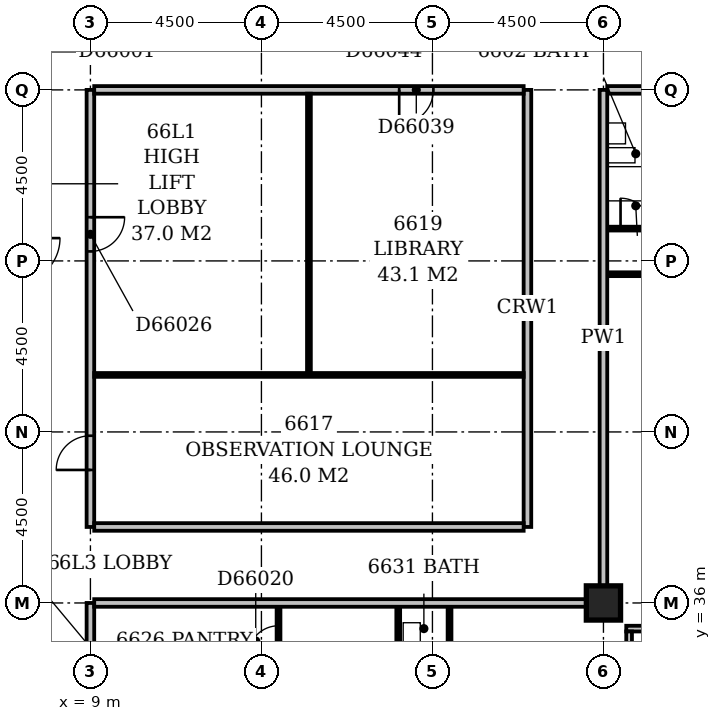
"""IFC4 building model, lengths in metres.
Left out: names, types, materials, properties, quantities, classifications, styles, units other than length and angle.
Written with IfcOpenShell. Run it as: python <this file> out.ifc"""

import sys

from ifc_helpers import new_model, si_unit, direction, frame, frame_2d, origin, origin_2d, place, context, subcontext, project, spatial, rectangle, extrude, element, fill, save


model = new_model("IFC4")
c1 = context("Model", 3, precision=1e-05, world=origin(), true_north=direction((0.0, 1.0)))
c2 = subcontext(c1, "Body", "Model", "MODEL_VIEW")
j1 = project(units=[si_unit("LENGTHUNIT", "METRE"), si_unit("PLANEANGLEUNIT", "RADIAN")], contexts=[c1])
p1 = place(None, origin())
s1 = spatial("IfcSite", under=j1, at=p1, CompositionType="ELEMENT")
p2 = place(p1, origin())
s2 = spatial("IfcBuilding", under=s1, at=p2, CompositionType="ELEMENT")
p3 = place(p2, frame((0.0, 0.0, 254.6)))
s3 = spatial("IfcBuildingStorey", under=s2, at=p3, CompositionType="ELEMENT", Elevation=254.6)
p4 = place(p3, frame((22.5, 36.0, -0.3), z_axis=(0.0, 0.0, 1.0), x_axis=(1.0, 0.0, 0.0)))
e1 = element("IfcColumn", 1, at=p4, inside=s3, PredefinedType="COLUMN", context=c2, shape_type="SweptSolid", body=[
    extrude(rectangle(XDim=0.9, YDim=0.9, at=origin_2d()), origin(), (0.0, 0.0, 1.0), 3.45),
])
p5 = place(p3, frame((23.175, 17.4, 0.0), z_axis=(0.0, 0.0, 1.0), x_axis=(0.0, 1.0, 0.0)))
e2 = element("IfcWall", 2, at=p5, inside=s3, PredefinedType="STANDARD", context=c2, shape_type="SweptSolid", body=[
    extrude(rectangle(XDim=17.85, YDim=0.15, at=frame_2d((8.925, 0.0))), origin(), (0.0, 0.0, 1.0), 2.7),
])
p6 = place(p5, frame((1.65, 0.0, 0.6)))
e3 = element("IfcOpeningElement", 3, at=p6, cuts=e2, PredefinedType="OPENING", context=c2, shape_type="SweptSolid", body=[
    extrude(rectangle(XDim=2.4, YDim=1.8, at=frame_2d((1.2, 0.9))), frame((0.0, 0.087, 0.0), z_axis=(0.0, -1.0, 0.0), x_axis=(1.0, 0.0, 0.0)), (0.0, 0.0, 1.0), 0.174),
])
p7 = place(p5, frame((6.15, 0.0, 0.6)))
e4 = element("IfcOpeningElement", 4, at=p7, cuts=e2, PredefinedType="OPENING", context=c2, shape_type="SweptSolid", body=[
    extrude(rectangle(XDim=2.4, YDim=1.8, at=frame_2d((1.2, 0.9))), frame((0.0, 0.087, 0.0), z_axis=(0.0, -1.0, 0.0), x_axis=(1.0, 0.0, 0.0)), (0.0, 0.0, 1.0), 0.174),
])
p8 = place(p5, frame((10.65, 0.0, 0.6)))
e5 = element("IfcOpeningElement", 5, at=p8, cuts=e2, PredefinedType="OPENING", context=c2, shape_type="SweptSolid", body=[
    extrude(rectangle(XDim=2.4, YDim=1.8, at=frame_2d((1.2, 0.9))), frame((0.0, 0.087, 0.0), z_axis=(0.0, -1.0, 0.0), x_axis=(1.0, 0.0, 0.0)), (0.0, 0.0, 1.0), 0.174),
])
p9 = place(p5, frame((14.817, 0.0, 0.6)))
e6 = element("IfcOpeningElement", 6, at=p9, cuts=e2, PredefinedType="OPENING", context=c2, shape_type="SweptSolid", body=[
    extrude(rectangle(XDim=0.9, YDim=1.8, at=frame_2d((0.45, 0.9))), frame((0.0, 0.087, 0.0), z_axis=(0.0, -1.0, 0.0), x_axis=(1.0, 0.0, 0.0)), (0.0, 0.0, 1.0), 0.174),
])
p10 = place(p3, frame((23.1, 35.325, 0.0), z_axis=(0.0, 0.0, 1.0), x_axis=(1.0, 0.0, 0.0)))
e7 = element("IfcWall", 7, at=p10, inside=s3, PredefinedType="STANDARD", context=c2, shape_type="SweptSolid", body=[
    extrude(rectangle(XDim=18.15, YDim=0.15, at=frame_2d((9.075, 0.0))), origin(), (0.0, 0.0, 1.0), 2.7),
])
p11 = place(p10, frame((0.45, 0.0, 0.6)))
e8 = element("IfcOpeningElement", 8, at=p11, cuts=e7, PredefinedType="OPENING", context=c2, shape_type="SweptSolid", body=[
    extrude(rectangle(XDim=2.4, YDim=1.8, at=frame_2d((1.2, 0.9))), frame((0.0, 0.087, 0.0), z_axis=(0.0, -1.0, 0.0), x_axis=(1.0, 0.0, 0.0)), (0.0, 0.0, 1.0), 0.174),
])
p12 = place(p10, frame((4.95, 0.0, 0.6)))
e9 = element("IfcOpeningElement", 9, at=p12, cuts=e7, PredefinedType="OPENING", context=c2, shape_type="SweptSolid", body=[
    extrude(rectangle(XDim=2.4, YDim=1.8, at=frame_2d((1.2, 0.9))), frame((0.0, 0.087, 0.0), z_axis=(0.0, -1.0, 0.0), x_axis=(1.0, 0.0, 0.0)), (0.0, 0.0, 1.0), 0.174),
])
p13 = place(p10, frame((9.45, 0.0, 0.6)))
e10 = element("IfcOpeningElement", 10, at=p13, cuts=e7, PredefinedType="OPENING", context=c2, shape_type="SweptSolid", body=[
    extrude(rectangle(XDim=2.4, YDim=1.8, at=frame_2d((1.2, 0.9))), frame((0.0, 0.087, 0.0), z_axis=(0.0, -1.0, 0.0), x_axis=(1.0, 0.0, 0.0)), (0.0, 0.0, 1.0), 0.174),
])
p14 = place(p10, frame((13.646, 0.0, 0.6)))
e11 = element("IfcOpeningElement", 11, at=p14, cuts=e7, PredefinedType="OPENING", context=c2, shape_type="SweptSolid", body=[
    extrude(rectangle(XDim=1.8, YDim=1.8, at=frame_2d((0.9, 0.9))), frame((0.0, 0.087, 0.0), z_axis=(0.0, -1.0, 0.0), x_axis=(1.0, 0.0, 0.0)), (0.0, 0.0, 1.0), 0.174),
])
p15 = place(p3, frame((17.1, 17.4, 0.0), z_axis=(0.0, 0.0, 1.0), x_axis=(0.0, 1.0, 0.0)))
e12 = element("IfcWall", 12, at=p15, inside=s3, PredefinedType="PARTITIONING", context=c2, shape_type="SweptSolid", body=[
    extrude(rectangle(XDim=18.5, YDim=0.1, at=frame_2d((9.25, 0.0))), origin(), (0.0, 0.0, 1.0), 3.15),
])
p16 = place(p15, frame((3.55, 0.0, 0.0)))
e13 = element("IfcOpeningElement", 13, at=p16, cuts=e12, PredefinedType="OPENING", context=c2, shape_type="SweptSolid", body=[
    extrude(rectangle(XDim=0.9, YDim=2.1, at=frame_2d((0.45, 1.05))), frame((0.0, 0.062, 0.0), z_axis=(0.0, -1.0, 0.0), x_axis=(1.0, 0.0, 0.0)), (0.0, 0.0, 1.0), 0.124),
])
p17 = place(p15, frame((9.1, 0.0, 0.0)))
e14 = element("IfcOpeningElement", 14, at=p17, cuts=e12, PredefinedType="OPENING", context=c2, shape_type="SweptSolid", body=[
    extrude(rectangle(XDim=0.9, YDim=2.1, at=frame_2d((0.45, 1.05))), frame((0.0, 0.062, 0.0), z_axis=(0.0, -1.0, 0.0), x_axis=(1.0, 0.0, 0.0)), (0.0, 0.0, 1.0), 0.124),
])
p18 = place(p15, frame((14.75, 0.0, 0.0)))
e15 = element("IfcOpeningElement", 15, at=p18, cuts=e12, PredefinedType="OPENING", context=c2, shape_type="SweptSolid", body=[
    extrude(rectangle(XDim=0.9, YDim=2.1, at=frame_2d((0.45, 1.05))), frame((0.0, 0.062, 0.0), z_axis=(0.0, -1.0, 0.0), x_axis=(1.0, 0.0, 0.0)), (0.0, 0.0, 1.0), 0.124),
])
p19 = place(p3, frame((9.0, 18.45, 0.0), z_axis=(0.0, 0.0, 1.0), x_axis=(0.0, 1.0, 0.0)))
e16 = element("IfcWall", 16, at=p19, inside=s3, PredefinedType="PARTITIONING", context=c2, shape_type="SweptSolid", body=[
    extrude(rectangle(XDim=17.55, YDim=0.2, at=frame_2d((8.775, 0.0))), origin(), (0.0, 0.0, 1.0), 3.15),
])
p20 = place(p19, frame((6.75, 0.0, 0.0)))
e17 = element("IfcOpeningElement", 17, at=p20, cuts=e16, PredefinedType="OPENING", context=c2, shape_type="SweptSolid", body=[
    extrude(rectangle(XDim=1.0, YDim=2.1, at=frame_2d((0.5, 1.05))), frame((0.0, 0.112, 0.0), z_axis=(0.0, -1.0, 0.0), x_axis=(1.0, 0.0, 0.0)), (0.0, 0.0, 1.0), 0.224),
])
p21 = place(p3, frame((13.95, 26.5, 0.0), z_axis=(0.0, 0.0, 1.0), x_axis=(0.0, 1.0, 0.0)))
e18 = element("IfcWall", 18, at=p21, inside=s3, PredefinedType="PARTITIONING", context=c2, shape_type="SweptSolid", body=[
    extrude(rectangle(XDim=9.4, YDim=0.1, at=frame_2d((4.7, 0.0))), origin(), (0.0, 0.0, 1.0), 3.15),
])
p22 = place(p21, frame((0.8, 0.0, 0.0)))
e19 = element("IfcOpeningElement", 19, at=p22, cuts=e18, PredefinedType="OPENING", context=c2, shape_type="SweptSolid", body=[
    extrude(rectangle(XDim=0.8, YDim=2.1, at=frame_2d((0.4, 1.05))), frame((0.0, 0.062, 0.0), z_axis=(0.0, -1.0, 0.0), x_axis=(1.0, 0.0, 0.0)), (0.0, 0.0, 1.0), 0.124),
])
p23 = place(p21, frame((8.1, 0.0, 0.0)))
e20 = element("IfcOpeningElement", 20, at=p23, cuts=e18, PredefinedType="OPENING", context=c2, shape_type="SweptSolid", body=[
    extrude(rectangle(XDim=0.8, YDim=2.1, at=frame_2d((0.4, 1.05))), frame((0.0, 0.062, 0.0), z_axis=(0.0, -1.0, 0.0), x_axis=(1.0, 0.0, 0.0)), (0.0, 0.0, 1.0), 0.124),
])
p24 = place(p21, frame((4.3, 0.0, 0.0)))
e21 = element("IfcOpeningElement", 21, at=p24, cuts=e18, PredefinedType="OPENING", context=c2, shape_type="SweptSolid", body=[
    extrude(rectangle(XDim=0.8, YDim=2.1, at=frame_2d((0.4, 1.05))), frame((0.0, 0.062, 0.0), z_axis=(0.0, -1.0, 0.0), x_axis=(1.0, 0.0, 0.0)), (0.0, 0.0, 1.0), 0.124),
])
p25 = place(p21, frame((6.1, 0.0, 0.0)))
e22 = element("IfcOpeningElement", 22, at=p25, cuts=e18, PredefinedType="OPENING", context=c2, shape_type="SweptSolid", body=[
    extrude(rectangle(XDim=0.8, YDim=2.1, at=frame_2d((0.4, 1.05))), frame((0.0, 0.062, 0.0), z_axis=(0.0, -1.0, 0.0), x_axis=(1.0, 0.0, 0.0)), (0.0, 0.0, 1.0), 0.124),
])
p26 = place(p21, frame((2.75, 0.0, 0.0)))
e23 = element("IfcOpeningElement", 23, at=p26, cuts=e18, PredefinedType="OPENING", context=c2, shape_type="SweptSolid", body=[
    extrude(rectangle(XDim=0.8, YDim=2.1, at=frame_2d((0.4, 1.05))), frame((0.0, 0.062, 0.0), z_axis=(0.0, -1.0, 0.0), x_axis=(1.0, 0.0, 0.0)), (0.0, 0.0, 1.0), 0.124),
])
p27 = place(p3, frame((18.45, 33.7, 0.0), z_axis=(0.0, 0.0, 1.0), x_axis=(0.0, 1.0, 0.0)))
e24 = element("IfcWall", 24, at=p27, inside=s3, PredefinedType="PLUMBINGWALL", context=c2, shape_type="SweptSolid", body=[
    extrude(rectangle(XDim=2.2, YDim=0.1, at=frame_2d((1.1, 0.0))), origin(), (0.0, 0.0, 1.0), 3.15),
])
p28 = place(p3, frame((9.1, 36.0, 0.0), z_axis=(0.0, 0.0, 1.0), x_axis=(1.0, 0.0, 0.0)))
e25 = element("IfcWall", 25, at=p28, inside=s3, PredefinedType="PARTITIONING", context=c2, shape_type="SweptSolid", body=[
    extrude(rectangle(XDim=12.95, YDim=0.2, at=frame_2d((6.475, 0.0))), origin(), (0.0, 0.0, 1.0), 3.15),
])
p29 = place(p3, frame((22.5, 36.45, 0.0), z_axis=(0.0, 0.0, 1.0), x_axis=(0.0, 1.0, 0.0)))
e26 = element("IfcWall", 26, at=p29, inside=s3, PredefinedType="PARTITIONING", context=c2, shape_type="SweptSolid", body=[
    extrude(rectangle(XDim=13.05, YDim=0.2, at=frame_2d((6.525, 0.0))), origin(), (0.0, 0.0, 1.0), 3.15),
])
p30 = place(p3, frame((9.0, 38.0, 0.0), z_axis=(0.0, 0.0, 1.0), x_axis=(0.0, 1.0, 0.0)))
e27 = element("IfcWall", 27, at=p30, inside=s3, PredefinedType="PARTITIONING", context=c2, shape_type="SweptSolid", body=[
    extrude(rectangle(XDim=11.5, YDim=0.2, at=frame_2d((5.75, 0.0))), origin(), (0.0, 0.0, 1.0), 3.15),
])
p31 = place(p30, frame((1.5, 0.0, 0.0)))
e28 = element("IfcOpeningElement", 28, at=p31, cuts=e27, PredefinedType="OPENING", context=c2, shape_type="SweptSolid", body=[
    extrude(rectangle(XDim=0.9, YDim=2.1, at=frame_2d((0.45, 1.05))), frame((0.0, 0.112, 0.0), z_axis=(0.0, -1.0, 0.0), x_axis=(1.0, 0.0, 0.0)), (0.0, 0.0, 1.0), 0.224),
])
p32 = place(p30, frame((7.25, 0.0, 0.0)))
e29 = element("IfcOpeningElement", 29, at=p32, cuts=e27, PredefinedType="OPENING", context=c2, shape_type="SweptSolid", body=[
    extrude(rectangle(XDim=0.9, YDim=2.1, at=frame_2d((0.45, 1.05))), frame((0.0, 0.112, 0.0), z_axis=(0.0, -1.0, 0.0), x_axis=(1.0, 0.0, 0.0)), (0.0, 0.0, 1.0), 0.224),
])
p33 = place(p3, frame((9.1, 38.0, 0.0), z_axis=(0.0, 0.0, 1.0), x_axis=(1.0, 0.0, 0.0)))
e30 = element("IfcWall", 30, at=p33, inside=s3, PredefinedType="PARTITIONING", context=c2, shape_type="SweptSolid", body=[
    extrude(rectangle(XDim=11.3, YDim=0.2, at=frame_2d((5.65, 0.0))), origin(), (0.0, 0.0, 1.0), 3.15),
])
p34 = place(p3, frame((20.5, 38.0, 0.0), z_axis=(0.0, 0.0, 1.0), x_axis=(0.0, 1.0, 0.0)))
e31 = element("IfcWall", 31, at=p34, inside=s3, PredefinedType="PARTITIONING", context=c2, shape_type="SweptSolid", body=[
    extrude(rectangle(XDim=11.5, YDim=0.2, at=frame_2d((5.75, 0.0))), origin(), (0.0, 0.0, 1.0), 3.15),
])
p35 = place(p3, frame((9.1, 42.0, 0.0), z_axis=(0.0, 0.0, 1.0), x_axis=(1.0, 0.0, 0.0)))
e32 = element("IfcWall", 32, at=p35, inside=s3, PredefinedType="PARTITIONING", context=c2, shape_type="SweptSolid", body=[
    extrude(rectangle(XDim=11.3, YDim=0.1, at=frame_2d((5.65, 0.0))), origin(), (0.0, 0.0, 1.0), 3.15),
])
p36 = place(p3, frame((14.75, 42.05, 0.0), z_axis=(0.0, 0.0, 1.0), x_axis=(0.0, 1.0, 0.0)))
e33 = element("IfcWall", 33, at=p36, inside=s3, PredefinedType="PARTITIONING", context=c2, shape_type="SweptSolid", body=[
    extrude(rectangle(XDim=7.35, YDim=0.1, at=frame_2d((3.675, 0.0))), origin(), (0.0, 0.0, 1.0), 3.15),
])
p37 = place(p3, frame((22.6, 44.65, 0.0), z_axis=(0.0, 0.0, 1.0), x_axis=(1.0, 0.0, 0.0)))
e34 = element("IfcWall", 34, at=p37, inside=s3, PredefinedType="PARTITIONING", context=c2, shape_type="SweptSolid", body=[
    extrude(rectangle(XDim=4.3, YDim=0.1, at=frame_2d((2.15, 0.0))), origin(), (0.0, 0.0, 1.0), 3.15),
])
p38 = place(p37, frame((1.7, 0.0, 0.0)))
e35 = element("IfcOpeningElement", 35, at=p38, cuts=e34, PredefinedType="OPENING", context=c2, shape_type="SweptSolid", body=[
    extrude(rectangle(XDim=0.9, YDim=2.1, at=frame_2d((0.45, 1.05))), frame((0.0, 0.062, 0.0), z_axis=(0.0, -1.0, 0.0), x_axis=(1.0, 0.0, 0.0)), (0.0, 0.0, 1.0), 0.124),
])
p39 = place(p3, frame((22.6, 45.85, 0.0), z_axis=(0.0, 0.0, 1.0), x_axis=(1.0, 0.0, 0.0)))
e36 = element("IfcWall", 36, at=p39, inside=s3, PredefinedType="PARTITIONING", context=c2, shape_type="SweptSolid", body=[
    extrude(rectangle(XDim=1.55, YDim=0.1, at=frame_2d((0.775, 0.0))), origin(), (0.0, 0.0, 1.0), 3.15),
])
p40 = place(p39, frame((0.35, 0.0, 0.0)))
e37 = element("IfcOpeningElement", 37, at=p40, cuts=e36, PredefinedType="OPENING", context=c2, shape_type="SweptSolid", body=[
    extrude(rectangle(XDim=0.8, YDim=2.1, at=frame_2d((0.4, 1.05))), frame((0.0, 0.062, 0.0), z_axis=(0.0, -1.0, 0.0), x_axis=(1.0, 0.0, 0.0)), (0.0, 0.0, 1.0), 0.124),
])
p41 = place(p3, frame((9.1, 49.5, 0.0), z_axis=(0.0, 0.0, 1.0), x_axis=(1.0, 0.0, 0.0)))
e38 = element("IfcWall", 38, at=p41, inside=s3, PredefinedType="PARTITIONING", context=c2, shape_type="SweptSolid", body=[
    extrude(rectangle(XDim=11.3, YDim=0.2, at=frame_2d((5.65, 0.0))), origin(), (0.0, 0.0, 1.0), 3.15),
])
p42 = place(p41, frame((8.025, 0.0, 0.0)))
e39 = element("IfcOpeningElement", 39, at=p42, cuts=e38, PredefinedType="OPENING", context=c2, shape_type="SweptSolid", body=[
    extrude(rectangle(XDim=0.9, YDim=2.1, at=frame_2d((0.45, 1.05))), frame((0.0, 0.112, 0.0), z_axis=(0.0, -1.0, 0.0), x_axis=(1.0, 0.0, 0.0)), (0.0, 0.0, 1.0), 0.224),
])
p43 = place(p3, frame((22.6, 49.5, 0.0), z_axis=(0.0, 0.0, 1.0), x_axis=(1.0, 0.0, 0.0)))
e40 = element("IfcWall", 40, at=p43, inside=s3, PredefinedType="PARTITIONING", context=c2, shape_type="SweptSolid", body=[
    extrude(rectangle(XDim=21.95, YDim=0.2, at=frame_2d((10.975, 0.0))), origin(), (0.0, 0.0, 1.0), 3.15),
])
p44 = place(p43, frame((1.85, 0.0, 0.0)))
e41 = element("IfcOpeningElement", 41, at=p44, cuts=e40, PredefinedType="OPENING", context=c2, shape_type="SweptSolid", body=[
    extrude(rectangle(XDim=1.0, YDim=2.1, at=frame_2d((0.5, 1.05))), frame((0.0, 0.112, 0.0), z_axis=(0.0, -1.0, 0.0), x_axis=(1.0, 0.0, 0.0)), (0.0, 0.0, 1.0), 0.224),
])
p45 = place(p43, frame((9.7, 0.0, 0.0)))
e42 = element("IfcOpeningElement", 42, at=p45, cuts=e40, PredefinedType="OPENING", context=c2, shape_type="SweptSolid", body=[
    extrude(rectangle(XDim=1.0, YDim=2.1, at=frame_2d((0.5, 1.05))), frame((0.0, 0.112, 0.0), z_axis=(0.0, -1.0, 0.0), x_axis=(1.0, 0.0, 0.0)), (0.0, 0.0, 1.0), 0.224),
])
p46 = place(p43, frame((15.05, 0.0, 0.0)))
e43 = element("IfcOpeningElement", 43, at=p46, cuts=e40, PredefinedType="OPENING", context=c2, shape_type="SweptSolid", body=[
    extrude(rectangle(XDim=1.0, YDim=2.1, at=frame_2d((0.5, 1.05))), frame((0.0, 0.112, 0.0), z_axis=(0.0, -1.0, 0.0), x_axis=(1.0, 0.0, 0.0)), (0.0, 0.0, 1.0), 0.224),
])
p47 = place(p23, origin())
e44 = element("IfcDoor", 44, at=p47, inside=s3, OperationType="SINGLE_SWING_LEFT", PredefinedType="DOOR", context=c2, shape_type="SweptSolid", body=[
    extrude(rectangle(XDim=0.8, YDim=2.1, at=frame_2d((0.4, 1.05))), frame((0.0, 0.025, 0.0), z_axis=(0.0, -1.0, 0.0), x_axis=(1.0, 0.0, 0.0)), (0.0, 0.0, 1.0), 0.05),
])
fill(e20, e44)
p48 = place(p31, origin())
e45 = element("IfcDoor", 45, at=p48, inside=s3, OperationType="SINGLE_SWING_LEFT", PredefinedType="DOOR", context=c2, shape_type="SweptSolid", body=[
    extrude(rectangle(XDim=0.9, YDim=2.1, at=frame_2d((0.45, 1.05))), frame((0.0, 0.025, 0.0), z_axis=(0.0, -1.0, 0.0), x_axis=(1.0, 0.0, 0.0)), (0.0, 0.0, 1.0), 0.05),
])
fill(e28, e45)
p49 = place(p32, origin())
e46 = element("IfcDoor", 46, at=p49, inside=s3, OperationType="SINGLE_SWING_RIGHT", PredefinedType="DOOR", context=c2, shape_type="SweptSolid", body=[
    extrude(rectangle(XDim=0.9, YDim=2.1, at=frame_2d((0.45, 1.05))), frame((0.0, 0.025, 0.0), z_axis=(0.0, -1.0, 0.0), x_axis=(1.0, 0.0, 0.0)), (0.0, 0.0, 1.0), 0.05),
])
fill(e29, e46)
p50 = place(p40, origin())
e47 = element("IfcDoor", 47, at=p50, inside=s3, OperationType="SINGLE_SWING_LEFT", PredefinedType="DOOR", context=c2, shape_type="SweptSolid", body=[
    extrude(rectangle(XDim=0.8, YDim=2.1, at=frame_2d((0.4, 1.05))), frame((0.0, 0.025, 0.0), z_axis=(0.0, -1.0, 0.0), x_axis=(1.0, 0.0, 0.0)), (0.0, 0.0, 1.0), 0.05),
])
fill(e37, e47)
p51 = place(p42, frame((0.9, 0.0, 0.0), z_axis=(0.0, 0.0, 1.0), x_axis=(-1.0, 0.0, 0.0)))
e48 = element("IfcDoor", 48, at=p51, inside=s3, OperationType="SINGLE_SWING_RIGHT", PredefinedType="DOOR", context=c2, shape_type="SweptSolid", body=[
    extrude(rectangle(XDim=0.9, YDim=2.1, at=frame_2d((0.45, 1.05))), frame((0.0, 0.025, 0.0), z_axis=(0.0, -1.0, 0.0), x_axis=(1.0, 0.0, 0.0)), (0.0, 0.0, 1.0), 0.05),
])
fill(e39, e48)
save(model, sys.argv[1])
